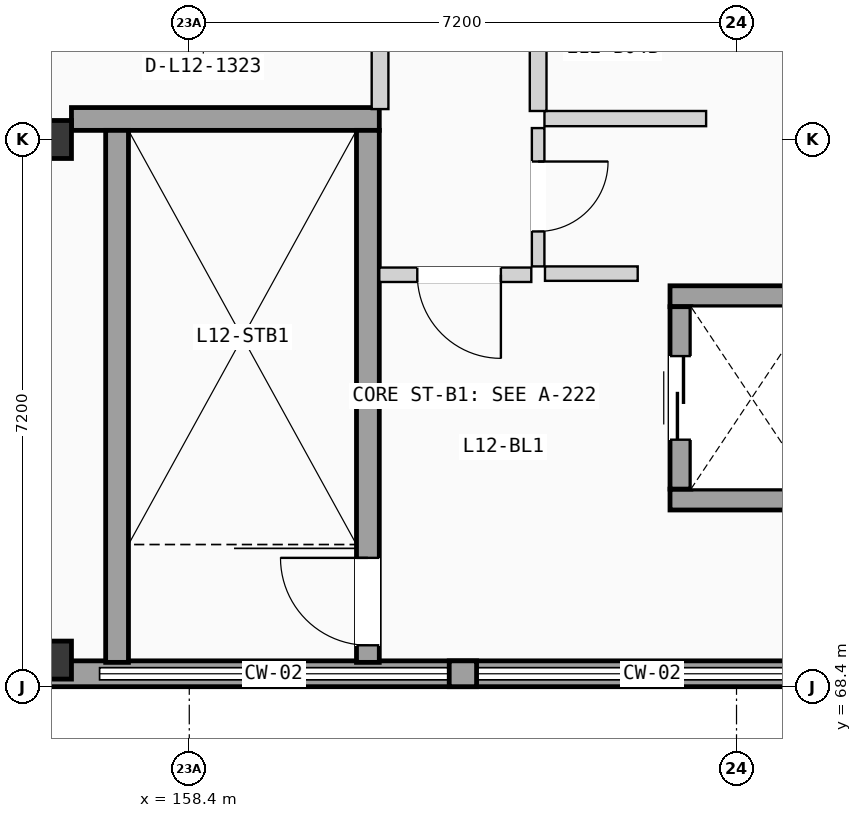
"""IFC4 building model, lengths in metres.
Left out: names, types, materials, properties, quantities, classifications, styles, units other than length and angle.
Written with IfcOpenShell. Run it as: python <this file> out.ifc"""

import sys

from ifc_helpers import new_model, si_unit, direction, frame, frame_2d, origin, origin_2d, place, context, subcontext, project, spatial, rectangle, extrude, element, fill, save


model = new_model("IFC4")
c1 = context("Model", 3, precision=1e-05, world=origin(), true_north=direction((0.0, 1.0)))
c2 = subcontext(c1, "Body", "Model", "MODEL_VIEW")
j1 = project(units=[si_unit("LENGTHUNIT", "METRE"), si_unit("PLANEANGLEUNIT", "RADIAN")], contexts=[c1])
p1 = place(None, origin())
s1 = spatial("IfcSite", under=j1, at=p1, CompositionType="ELEMENT")
p2 = place(p1, origin())
s2 = spatial("IfcBuilding", under=s1, at=p2, CompositionType="ELEMENT")
p3 = place(p2, frame((0.0, 0.0, 40.425)))
s3 = spatial("IfcBuildingStorey", under=s2, at=p3, CompositionType="ELEMENT", Elevation=40.425)
for number, where, z_axis, x_axis in (
    (1, (156.6, 68.75, 0.0), (0.0, 0.0, 1.0), (1.0, 0.0, 0.0)),
    (2, (156.6, 75.6, 0.0), (0.0, 0.0, 1.0), (1.0, 0.0, 0.0)),
):
    element("IfcColumn", number, at=place(p3, frame(where, z_axis=z_axis, x_axis=x_axis)), inside=s3, PredefinedType="COLUMN", context=c2, shape_type="SweptSolid", body=[
        extrude(rectangle(XDim=0.5, YDim=0.5, at=origin_2d()), origin(), (0.0, 0.0, 1.0), 2.85),
    ])
p4 = place(p3, frame((156.0, 68.57, 0.0), z_axis=(0.0, 0.0, 1.0), x_axis=(1.0, 0.0, 0.0)))
e3 = element("IfcWall", 3, at=p4, inside=s3, PredefinedType="SOLIDWALL", context=c2, shape_type="SweptSolid", body=[
    extrude(rectangle(XDim=12.0, YDim=0.34, at=frame_2d((6.0, 0.0))), origin(), (0.0, 0.0, 1.0), 1.11),
])
p5 = place(p3, frame((161.82, 68.57, 1.11), z_axis=(0.0, 0.0, 1.0), x_axis=(1.0, 0.0, 0.0)))
e4 = element("IfcWall", 4, at=p5, inside=s3, PredefinedType="SOLIDWALL", context=c2, shape_type="SweptSolid", body=[
    extrude(rectangle(XDim=0.36, YDim=0.34, at=frame_2d((0.18, 0.0))), origin(), (0.0, 0.0, 1.0), 1.44),
])
p6 = place(p3, frame((156.85, 75.87, 0.0), z_axis=(0.0, 0.0, 1.0), x_axis=(1.0, 0.0, 0.0)))
e5 = element("IfcWall", 5, at=p6, inside=s3, PredefinedType="SHEAR", context=c2, shape_type="SweptSolid", body=[
    extrude(rectangle(XDim=4.05, YDim=0.3, at=frame_2d((2.025, 0.0))), origin(), (0.0, 0.0, 1.0), 2.55),
])
p7 = place(p3, frame((157.45, 68.72, 0.0), z_axis=(0.0, 0.0, 1.0), x_axis=(0.0, 1.0, 0.0)))
e6 = element("IfcWall", 6, at=p7, inside=s3, PredefinedType="SHEAR", context=c2, shape_type="SweptSolid", body=[
    extrude(rectangle(XDim=7.0, YDim=0.3, at=frame_2d((3.5, 0.0))), origin(), (0.0, 0.0, 1.0), 2.55),
])
p8 = place(p3, frame((160.75, 68.72, 0.0), z_axis=(0.0, 0.0, 1.0), x_axis=(0.0, 1.0, 0.0)))
e7 = element("IfcWall", 7, at=p8, inside=s3, PredefinedType="SHEAR", context=c2, shape_type="SweptSolid", body=[
    extrude(rectangle(XDim=7.0, YDim=0.3, at=frame_2d((3.5, 0.0))), origin(), (0.0, 0.0, 1.0), 2.55),
])
p9 = place(p8, frame((0.225, 0.0, 0.0)))
e8 = element("IfcOpeningElement", 8, at=p9, cuts=e7, PredefinedType="OPENING", context=c2, shape_type="SweptSolid", body=[
    extrude(rectangle(XDim=1.15, YDim=2.12, at=frame_2d((0.575, 1.06))), frame((0.0, 0.16, 0.0), z_axis=(0.0, -1.0, 0.0), x_axis=(1.0, 0.0, 0.0)), (0.0, 0.0, 1.0), 0.32),
])
for number, where, z_axis, x_axis in (
    (9, (164.725, 70.863, 0.0), (0.0, 0.0, 1.0), (1.0, 0.0, 0.0)),
    (10, (164.725, 73.538, 0.0), (0.0, 0.0, 1.0), (1.0, 0.0, 0.0)),
):
    element("IfcWall", number, at=place(p3, frame(where, z_axis=z_axis, x_axis=x_axis)), inside=s3, PredefinedType="SHEAR", context=c2, shape_type="SweptSolid", body=[
        extrude(rectangle(XDim=2.15, YDim=0.275, at=frame_2d((1.075, 0.0))), origin(), (0.0, 0.0, 1.0), 2.55),
    ])
p10 = place(p3, frame((164.863, 71.0, 0.0), z_axis=(0.0, 0.0, 1.0), x_axis=(0.0, 1.0, 0.0)))
e11 = element("IfcWall", 11, at=p10, inside=s3, PredefinedType="SHEAR", context=c2, shape_type="SweptSolid", body=[
    extrude(rectangle(XDim=2.4, YDim=0.275, at=frame_2d((1.2, 0.0))), origin(), (0.0, 0.0, 1.0), 2.55),
])
p11 = place(p10, frame((0.65, 0.0, 0.0)))
e12 = element("IfcOpeningElement", 12, at=p11, cuts=e11, PredefinedType="OPENING", context=c2, shape_type="SweptSolid", body=[
    extrude(rectangle(XDim=1.1, YDim=2.15, at=frame_2d((0.55, 1.075))), frame((0.0, 0.147, 0.0), z_axis=(0.0, -1.0, 0.0), x_axis=(1.0, 0.0, 0.0)), (0.0, 0.0, 1.0), 0.295),
])
p12 = place(p3, frame((163.08, 73.835, 0.0), z_axis=(0.0, 0.0, 1.0), x_axis=(1.0, 0.0, 0.0)))
e13 = element("IfcWall", 13, at=p12, inside=s3, PredefinedType="PARTITIONING", context=c2, shape_type="SweptSolid", body=[
    extrude(rectangle(XDim=1.22, YDim=0.19, at=frame_2d((0.61, 0.0))), origin(), (0.0, 0.0, 1.0), 2.39),
])
p13 = place(p3, frame((160.9, 73.82, 0.0), z_axis=(0.0, 0.0, 1.0), x_axis=(1.0, 0.0, 0.0)))
e14 = element("IfcWall", 14, at=p13, inside=s3, PredefinedType="PARTITIONING", context=c2, shape_type="SweptSolid", body=[
    extrude(rectangle(XDim=2.0, YDim=0.19, at=frame_2d((1.0, 0.0))), origin(), (0.0, 0.0, 1.0), 2.39),
])
p14 = place(p13, frame((0.5, 0.0, 0.0)))
e15 = element("IfcOpeningElement", 15, at=p14, cuts=e14, PredefinedType="OPENING", context=c2, shape_type="SweptSolid", body=[
    extrude(rectangle(XDim=1.1, YDim=2.12, at=frame_2d((0.55, 1.06))), frame((0.0, 0.105, 0.0), z_axis=(0.0, -1.0, 0.0), x_axis=(1.0, 0.0, 0.0)), (0.0, 0.0, 1.0), 0.21),
])
p15 = place(p3, frame((162.99, 73.93, 0.0), z_axis=(0.0, 0.0, 1.0), x_axis=(0.0, 1.0, 0.0)))
e16 = element("IfcWall", 16, at=p15, inside=s3, PredefinedType="PARTITIONING", context=c2, shape_type="SweptSolid", body=[
    extrude(rectangle(XDim=1.82, YDim=0.165, at=frame_2d((0.91, 0.0))), origin(), (0.0, 0.0, 1.0), 2.39),
])
p16 = place(p15, frame((0.46, 0.0, 0.0)))
e17 = element("IfcOpeningElement", 17, at=p16, cuts=e16, PredefinedType="OPENING", context=c2, shape_type="SweptSolid", body=[
    extrude(rectangle(XDim=0.92, YDim=2.04, at=frame_2d((0.46, 1.02))), frame((0.0, 0.093, 0.0), z_axis=(0.0, -1.0, 0.0), x_axis=(1.0, 0.0, 0.0)), (0.0, 0.0, 1.0), 0.185),
])
p17 = place(p3, frame((163.073, 75.875, 0.0), z_axis=(0.0, 0.0, 1.0), x_axis=(1.0, 0.0, 0.0)))
e18 = element("IfcWall", 18, at=p17, inside=s3, PredefinedType="PLUMBINGWALL", context=c2, shape_type="SweptSolid", body=[
    extrude(rectangle(XDim=2.127, YDim=0.2, at=frame_2d((1.063, 0.0))), origin(), (0.0, 0.0, 1.0), 2.12),
])
p18 = place(p3, frame((160.91, 76.0, 0.0), z_axis=(0.0, 0.0, 1.0), x_axis=(0.0, 1.0, 0.0)))
e19 = element("IfcWall", 19, at=p18, inside=s3, PredefinedType="PLUMBINGWALL", context=c2, shape_type="SweptSolid", body=[
    extrude(rectangle(XDim=2.22, YDim=0.22, at=frame_2d((1.11, 0.0))), origin(), (0.0, 0.0, 1.0), 2.39),
])
p19 = place(p3, frame((162.99, 75.975, 0.0), z_axis=(0.0, 0.0, 1.0), x_axis=(0.0, 1.0, 0.0)))
e20 = element("IfcWall", 20, at=p19, inside=s3, PredefinedType="PLUMBINGWALL", context=c2, shape_type="SweptSolid", body=[
    extrude(rectangle(XDim=2.245, YDim=0.22, at=frame_2d((1.123, 0.0))), origin(), (0.0, 0.0, 1.0), 2.39),
])
p20 = place(p9, origin())
e21 = element("IfcDoor", 21, at=p20, inside=s3, OperationType="SINGLE_SWING_RIGHT", PredefinedType="DOOR", context=c2, shape_type="SweptSolid", body=[
    extrude(rectangle(XDim=1.15, YDim=2.12, at=frame_2d((0.575, 1.06))), frame((0.0, 0.025, 0.0), z_axis=(0.0, -1.0, 0.0), x_axis=(1.0, 0.0, 0.0)), (0.0, 0.0, 1.0), 0.05),
])
fill(e8, e21)
p21 = place(p11, origin())
e22 = element("IfcDoor", 22, at=p21, inside=s3, OperationType="SLIDING_TO_LEFT", PredefinedType="DOOR", context=c2, shape_type="SweptSolid", body=[
    extrude(rectangle(XDim=1.1, YDim=2.15, at=frame_2d((0.55, 1.075))), frame((0.0, 0.025, 0.0), z_axis=(0.0, -1.0, 0.0), x_axis=(1.0, 0.0, 0.0)), (0.0, 0.0, 1.0), 0.05),
])
fill(e12, e22)
p22 = place(p14, frame((1.1, 0.0, 0.0), z_axis=(0.0, 0.0, 1.0), x_axis=(-1.0, 0.0, 0.0)))
e23 = element("IfcDoor", 23, at=p22, inside=s3, OperationType="SINGLE_SWING_RIGHT", PredefinedType="DOOR", context=c2, shape_type="SweptSolid", body=[
    extrude(rectangle(XDim=1.1, YDim=2.12, at=frame_2d((0.55, 1.06))), frame((0.0, 0.025, 0.0), z_axis=(0.0, -1.0, 0.0), x_axis=(1.0, 0.0, 0.0)), (0.0, 0.0, 1.0), 0.05),
])
fill(e15, e23)
p23 = place(p16, frame((0.92, 0.0, 0.0), z_axis=(0.0, 0.0, 1.0), x_axis=(-1.0, 0.0, 0.0)))
e24 = element("IfcDoor", 24, at=p23, inside=s3, OperationType="SINGLE_SWING_RIGHT", PredefinedType="DOOR", context=c2, shape_type="SweptSolid", body=[
    extrude(rectangle(XDim=0.92, YDim=2.04, at=frame_2d((0.46, 1.02))), frame((0.0, 0.025, 0.0), z_axis=(0.0, -1.0, 0.0), x_axis=(1.0, 0.0, 0.0)), (0.0, 0.0, 1.0), 0.05),
])
fill(e17, e24)
save(model, sys.argv[1])
